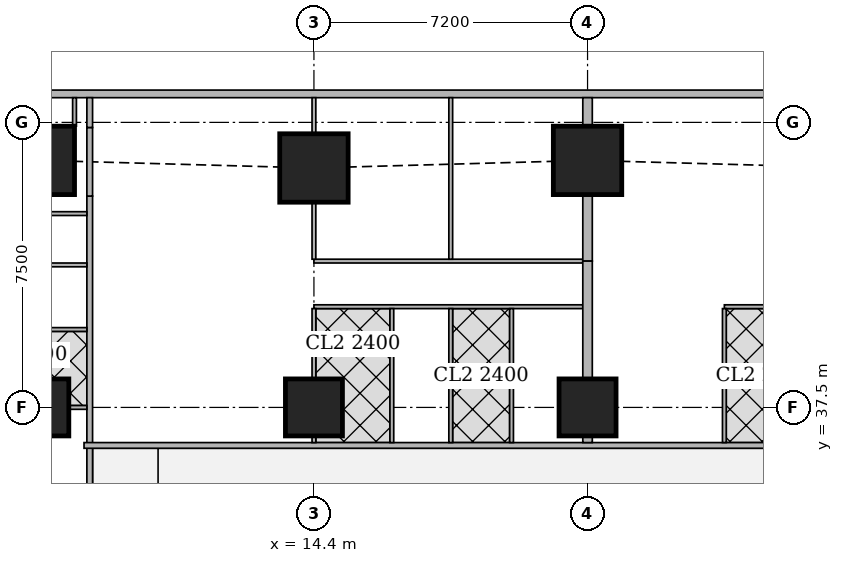
"""IFC4 building model, lengths in metres.
Left out: names, types, materials, properties, quantities, classifications, styles, units other than length and angle.
Written with IfcOpenShell. Run it as: python <this file> out.ifc"""

import sys

from ifc_helpers import new_model, si_unit, direction, frame, frame_2d, origin, origin_2d, place, context, subcontext, project, spatial, rectangle, extrude, element, fill, save


model = new_model("IFC4")
c1 = context("Model", 3, precision=1e-05, world=origin(), true_north=direction((0.0, 1.0)))
c2 = subcontext(c1, "Body", "Model", "MODEL_VIEW")
j1 = project(units=[si_unit("LENGTHUNIT", "METRE"), si_unit("PLANEANGLEUNIT", "RADIAN")], contexts=[c1])
p1 = place(None, origin())
s1 = spatial("IfcSite", under=j1, at=p1, CompositionType="ELEMENT")
p2 = place(p1, origin())
s2 = spatial("IfcBuilding", under=s1, at=p2, CompositionType="ELEMENT")
p3 = place(p2, frame((0.0, 0.0, 180.8)))
s3 = spatial("IfcBuildingStorey", under=s2, at=p3, CompositionType="ELEMENT", Elevation=180.8)
for number, where, z_axis, x_axis in (
    (1, (7.2, 37.5, 0.0), (0.0, 0.0, 1.0), (1.0, 0.0, 0.0)),
    (2, (14.4, 37.5, 0.0), (0.0, 0.0, 1.0), (1.0, 0.0, 0.0)),
    (3, (21.6, 37.5, 0.0), (0.0, 0.0, 1.0), (1.0, 0.0, 0.0)),
):
    element("IfcColumn", number, at=place(p3, frame(where, z_axis=z_axis, x_axis=x_axis)), inside=s3, PredefinedType="COLUMN", context=c2, shape_type="SweptSolid", body=[
        extrude(rectangle(XDim=1.5, YDim=1.5, at=origin_2d()), origin(), (0.0, 0.0, 1.0), 3.75),
    ])
for number, where, z_axis, x_axis in (
    (4, (7.2, 44.0, 0.0), (0.0, 0.0, 1.0), (1.0, 0.0, 0.0)),
    (5, (14.4, 43.8, 0.0), (0.0, 0.0, 1.0), (1.0, 0.0, 0.0)),
    (6, (21.6, 44.0, 0.0), (0.0, 0.0, 1.0), (1.0, 0.0, 0.0)),
):
    element("IfcColumn", number, at=place(p3, frame(where, z_axis=z_axis, x_axis=x_axis)), inside=s3, PredefinedType="COLUMN", context=c2, shape_type="SweptSolid", body=[
        extrude(rectangle(XDim=1.8, YDim=1.8, at=origin_2d()), origin(), (0.0, 0.0, 1.0), 3.75),
    ])
p4 = place(p3, frame((40.106, 45.75, 0.0), z_axis=(0.0, 0.0, 1.0), x_axis=(-1.0, 0.0, 0.0)))
e7 = element("IfcWall", 7, at=p4, inside=s3, PredefinedType="SOLIDWALL", context=c2, shape_type="SweptSolid", body=[
    extrude(rectangle(XDim=37.943, YDim=0.2, at=frame_2d((18.971, 0.0))), origin(), (0.0, 0.0, 1.0), 3.5),
])
p5 = place(p4, frame((8.606, 0.0, 0.9)))
e8 = element("IfcOpeningElement", 8, at=p5, cuts=e7, PredefinedType="OPENING", context=c2, shape_type="SweptSolid", body=[
    extrude(rectangle(XDim=1.8, YDim=1.5, at=frame_2d((0.9, 0.75))), frame((0.0, 0.11, 0.0), z_axis=(0.0, -1.0, 0.0), x_axis=(1.0, 0.0, 0.0)), (0.0, 0.0, 1.0), 0.22),
])
p6 = place(p4, frame((12.206, 0.0, 0.9)))
e9 = element("IfcOpeningElement", 9, at=p6, cuts=e7, PredefinedType="OPENING", context=c2, shape_type="SweptSolid", body=[
    extrude(rectangle(XDim=1.8, YDim=1.5, at=frame_2d((0.9, 0.75))), frame((0.0, 0.11, 0.0), z_axis=(0.0, -1.0, 0.0), x_axis=(1.0, 0.0, 0.0)), (0.0, 0.0, 1.0), 0.22),
])
p7 = place(p4, frame((15.806, 0.0, 0.9)))
e10 = element("IfcOpeningElement", 10, at=p7, cuts=e7, PredefinedType="OPENING", context=c2, shape_type="SweptSolid", body=[
    extrude(rectangle(XDim=1.8, YDim=1.5, at=frame_2d((0.9, 0.75))), frame((0.0, 0.11, 0.0), z_axis=(0.0, -1.0, 0.0), x_axis=(1.0, 0.0, 0.0)), (0.0, 0.0, 1.0), 0.22),
])
p8 = place(p4, frame((19.406, 0.0, 0.9)))
e11 = element("IfcOpeningElement", 11, at=p8, cuts=e7, PredefinedType="OPENING", context=c2, shape_type="SweptSolid", body=[
    extrude(rectangle(XDim=1.8, YDim=1.5, at=frame_2d((0.9, 0.75))), frame((0.0, 0.11, 0.0), z_axis=(0.0, -1.0, 0.0), x_axis=(1.0, 0.0, 0.0)), (0.0, 0.0, 1.0), 0.22),
])
p9 = place(p4, frame((23.006, 0.0, 0.9)))
e12 = element("IfcOpeningElement", 12, at=p9, cuts=e7, PredefinedType="OPENING", context=c2, shape_type="SweptSolid", body=[
    extrude(rectangle(XDim=1.8, YDim=1.5, at=frame_2d((0.9, 0.75))), frame((0.0, 0.11, 0.0), z_axis=(0.0, -1.0, 0.0), x_axis=(1.0, 0.0, 0.0)), (0.0, 0.0, 1.0), 0.22),
])
p10 = place(p4, frame((26.606, 0.0, 0.9)))
e13 = element("IfcOpeningElement", 13, at=p10, cuts=e7, PredefinedType="OPENING", context=c2, shape_type="SweptSolid", body=[
    extrude(rectangle(XDim=1.8, YDim=1.5, at=frame_2d((0.9, 0.75))), frame((0.0, 0.11, 0.0), z_axis=(0.0, -1.0, 0.0), x_axis=(1.0, 0.0, 0.0)), (0.0, 0.0, 1.0), 0.22),
])
p11 = place(p3, frame((8.5, 1.964, 0.0), z_axis=(0.0, 0.0, 1.0), x_axis=(0.0, 1.0, 0.0)))
e14 = element("IfcWall", 14, at=p11, inside=s3, PredefinedType="SOLIDWALL", context=c2, shape_type="SweptSolid", body=[
    extrude(rectangle(XDim=41.097, YDim=0.15, at=frame_2d((20.548, 0.0))), origin(), (0.0, 0.0, 1.0), 3.5),
])
p12 = place(p11, frame((10.661, 0.0, 0.0)))
e15 = element("IfcOpeningElement", 15, at=p12, cuts=e14, PredefinedType="OPENING", context=c2, shape_type="SweptSolid", body=[
    extrude(rectangle(XDim=1.0, YDim=2.1, at=frame_2d((0.5, 1.05))), frame((0.0, 0.085, 0.0), z_axis=(0.0, -1.0, 0.0), x_axis=(1.0, 0.0, 0.0)), (0.0, 0.0, 1.0), 0.17),
])
p13 = place(p11, frame((14.411, 0.0, 0.0)))
e16 = element("IfcOpeningElement", 16, at=p13, cuts=e14, PredefinedType="OPENING", context=c2, shape_type="SweptSolid", body=[
    extrude(rectangle(XDim=1.0, YDim=2.1, at=frame_2d((0.5, 1.05))), frame((0.0, 0.085, 0.0), z_axis=(0.0, -1.0, 0.0), x_axis=(1.0, 0.0, 0.0)), (0.0, 0.0, 1.0), 0.17),
])
p14 = place(p11, frame((21.911, 0.0, 0.0)))
e17 = element("IfcOpeningElement", 17, at=p14, cuts=e14, PredefinedType="OPENING", context=c2, shape_type="SweptSolid", body=[
    extrude(rectangle(XDim=1.0, YDim=2.1, at=frame_2d((0.5, 1.05))), frame((0.0, 0.085, 0.0), z_axis=(0.0, -1.0, 0.0), x_axis=(1.0, 0.0, 0.0)), (0.0, 0.0, 1.0), 0.17),
])
p15 = place(p11, frame((33.161, 0.0, 0.0)))
e18 = element("IfcOpeningElement", 18, at=p15, cuts=e14, PredefinedType="OPENING", context=c2, shape_type="SweptSolid", body=[
    extrude(rectangle(XDim=1.0, YDim=2.1, at=frame_2d((0.5, 1.05))), frame((0.0, 0.085, 0.0), z_axis=(0.0, -1.0, 0.0), x_axis=(1.0, 0.0, 0.0)), (0.0, 0.0, 1.0), 0.17),
])
p16 = place(p3, frame((8.5, 43.061, 0.0), z_axis=(0.0, 0.0, 1.0), x_axis=(0.0, 1.0, 0.0)))
e19 = element("IfcWall", 19, at=p16, inside=s3, PredefinedType="SOLIDWALL", context=c2, shape_type="SweptSolid", body=[
    extrude(rectangle(XDim=1.805, YDim=0.15, at=frame_2d((0.902, 0.0))), origin(), (0.0, 0.0, 1.0), 2.1),
])
p17 = place(p3, frame((8.5, 44.866, 0.0), z_axis=(0.0, 0.0, 1.0), x_axis=(0.0, 1.0, 0.0)))
e20 = element("IfcWall", 20, at=p17, inside=s3, PredefinedType="SOLIDWALL", context=c2, shape_type="SweptSolid", body=[
    extrude(rectangle(XDim=0.784, YDim=0.15, at=frame_2d((0.392, 0.0))), origin(), (0.0, 0.0, 1.0), 3.5),
])
p18 = place(p3, frame((8.35, 36.5, 0.0), z_axis=(0.0, 0.0, 1.0), x_axis=(1.0, 0.0, 0.0)))
e21 = element("IfcWall", 21, at=p18, inside=s3, PredefinedType="SOLIDWALL", context=c2, shape_type="SweptSolid", body=[
    extrude(rectangle(XDim=26.415, YDim=0.15, at=frame_2d((13.208, 0.0))), origin(), (0.0, 0.0, 1.0), 3.5),
])
p19 = place(p18, frame((2.6, 0.0, 0.0)))
e22 = element("IfcOpeningElement", 22, at=p19, cuts=e21, PredefinedType="OPENING", context=c2, shape_type="SweptSolid", body=[
    extrude(rectangle(XDim=1.0, YDim=2.1, at=frame_2d((0.5, 1.05))), frame((0.0, 0.085, 0.0), z_axis=(0.0, -1.0, 0.0), x_axis=(1.0, 0.0, 0.0)), (0.0, 0.0, 1.0), 0.17),
])
p20 = place(p18, frame((14.75, 0.0, 0.0)))
e23 = element("IfcOpeningElement", 23, at=p20, cuts=e21, PredefinedType="OPENING", context=c2, shape_type="SweptSolid", body=[
    extrude(rectangle(XDim=1.0, YDim=2.1, at=frame_2d((0.5, 1.05))), frame((0.0, 0.085, 0.0), z_axis=(0.0, -1.0, 0.0), x_axis=(1.0, 0.0, 0.0)), (0.0, 0.0, 1.0), 0.17),
])
p21 = place(p18, frame((23.923, 0.0, 0.0)))
e24 = element("IfcOpeningElement", 24, at=p21, cuts=e21, PredefinedType="OPENING", context=c2, shape_type="SweptSolid", body=[
    extrude(rectangle(XDim=1.0, YDim=2.1, at=frame_2d((0.5, 1.05))), frame((0.0, 0.085, 0.0), z_axis=(0.0, -1.0, 0.0), x_axis=(1.0, 0.0, 0.0)), (0.0, 0.0, 1.0), 0.17),
])
p22 = place(p3, frame((8.1, 45.65, 0.0), z_axis=(0.0, 0.0, 1.0), x_axis=(0.0, -1.0, 0.0)))
e25 = element("IfcWall", 25, at=p22, inside=s3, PredefinedType="PARTITIONING", context=c2, shape_type="SweptSolid", body=[
    extrude(rectangle(XDim=0.749, YDim=0.1, at=frame_2d((0.375, 0.0))), origin(), (0.0, 0.0, 1.0), 3.5),
])
p23 = place(p3, frame((7.951, 37.5, 0.0), z_axis=(0.0, 0.0, 1.0), x_axis=(1.0, 0.0, 0.0)))
e26 = element("IfcWall", 26, at=p23, inside=s3, PredefinedType="PARTITIONING", context=c2, shape_type="SweptSolid", body=[
    extrude(rectangle(XDim=0.474, YDim=0.1, at=frame_2d((0.237, 0.0))), origin(), (0.0, 0.0, 1.0), 3.5),
])
for number, where, z_axis, x_axis in (
    (27, (4.9, 41.25, 0.0), (0.0, 0.0, 1.0), (1.0, 0.0, 0.0)),
    (28, (4.9, 39.55, 0.0), (0.0, 0.0, 1.0), (1.0, 0.0, 0.0)),
):
    element("IfcWall", number, at=place(p3, frame(where, z_axis=z_axis, x_axis=x_axis)), inside=s3, PredefinedType="PARTITIONING", context=c2, shape_type="SweptSolid", body=[
        extrude(rectangle(XDim=3.525, YDim=0.1, at=frame_2d((1.763, 0.0))), origin(), (0.0, 0.0, 1.0), 3.5),
    ])
p24 = place(p3, frame((14.4, 41.35, 0.0), z_axis=(0.0, 0.0, 1.0), x_axis=(1.0, 0.0, 0.0)))
e29 = element("IfcWall", 29, at=p24, inside=s3, PredefinedType="PARTITIONING", context=c2, shape_type="SweptSolid", body=[
    extrude(rectangle(XDim=7.075, YDim=0.1, at=frame_2d((3.538, 0.0))), origin(), (0.0, 0.0, 1.0), 3.5),
])
p25 = place(p24, frame((0.2, 0.0, 0.0)))
e30 = element("IfcOpeningElement", 30, at=p25, cuts=e29, PredefinedType="OPENING", context=c2, shape_type="SweptSolid", body=[
    extrude(rectangle(XDim=0.9, YDim=2.1, at=frame_2d((0.45, 1.05))), frame((0.0, 0.06, 0.0), z_axis=(0.0, -1.0, 0.0), x_axis=(1.0, 0.0, 0.0)), (0.0, 0.0, 1.0), 0.12),
])
p26 = place(p24, frame((3.8, 0.0, 0.0)))
e31 = element("IfcOpeningElement", 31, at=p26, cuts=e29, PredefinedType="OPENING", context=c2, shape_type="SweptSolid", body=[
    extrude(rectangle(XDim=0.9, YDim=2.1, at=frame_2d((0.45, 1.05))), frame((0.0, 0.06, 0.0), z_axis=(0.0, -1.0, 0.0), x_axis=(1.0, 0.0, 0.0)), (0.0, 0.0, 1.0), 0.12),
])
p27 = place(p3, frame((14.4, 40.15, 0.0), z_axis=(0.0, 0.0, 1.0), x_axis=(1.0, 0.0, 0.0)))
e32 = element("IfcWall", 32, at=p27, inside=s3, PredefinedType="PARTITIONING", context=c2, shape_type="SweptSolid", body=[
    extrude(rectangle(XDim=7.075, YDim=0.1, at=frame_2d((3.538, 0.0))), origin(), (0.0, 0.0, 1.0), 3.5),
])
p28 = place(p27, frame((0.575, 0.0, 0.0)))
e33 = element("IfcOpeningElement", 33, at=p28, cuts=e32, PredefinedType="OPENING", context=c2, shape_type="SweptSolid", body=[
    extrude(rectangle(XDim=0.9, YDim=2.1, at=frame_2d((0.45, 1.05))), frame((0.0, 0.06, 0.0), z_axis=(0.0, -1.0, 0.0), x_axis=(1.0, 0.0, 0.0)), (0.0, 0.0, 1.0), 0.12),
])
p29 = place(p27, frame((3.95, 0.0, 0.0)))
e34 = element("IfcOpeningElement", 34, at=p29, cuts=e32, PredefinedType="OPENING", context=c2, shape_type="SweptSolid", body=[
    extrude(rectangle(XDim=0.9, YDim=2.1, at=frame_2d((0.45, 1.05))), frame((0.0, 0.06, 0.0), z_axis=(0.0, -1.0, 0.0), x_axis=(1.0, 0.0, 0.0)), (0.0, 0.0, 1.0), 0.12),
])
p30 = place(p27, frame((2.375, 0.0, 0.0)))
e35 = element("IfcOpeningElement", 35, at=p30, cuts=e32, PredefinedType="OPENING", context=c2, shape_type="SweptSolid", body=[
    extrude(rectangle(XDim=0.9, YDim=2.1, at=frame_2d((0.45, 1.05))), frame((0.0, 0.06, 0.0), z_axis=(0.0, -1.0, 0.0), x_axis=(1.0, 0.0, 0.0)), (0.0, 0.0, 1.0), 0.12),
])
p31 = place(p27, frame((5.75, 0.0, 0.0)))
e36 = element("IfcOpeningElement", 36, at=p31, cuts=e32, PredefinedType="OPENING", context=c2, shape_type="SweptSolid", body=[
    extrude(rectangle(XDim=0.9, YDim=2.1, at=frame_2d((0.45, 1.05))), frame((0.0, 0.06, 0.0), z_axis=(0.0, -1.0, 0.0), x_axis=(1.0, 0.0, 0.0)), (0.0, 0.0, 1.0), 0.12),
])
p32 = place(p3, frame((14.4, 41.4, 0.0), z_axis=(0.0, 0.0, 1.0), x_axis=(0.0, 1.0, 0.0)))
e37 = element("IfcWall", 37, at=p32, inside=s3, PredefinedType="PARTITIONING", context=c2, shape_type="SweptSolid", body=[
    extrude(rectangle(XDim=1.499, YDim=0.1, at=frame_2d((0.75, 0.0))), origin(), (0.0, 0.0, 1.0), 3.5),
])
p33 = place(p3, frame((14.4, 44.701, 0.0), z_axis=(0.0, 0.0, 1.0), x_axis=(0.0, 1.0, 0.0)))
e38 = element("IfcWall", 38, at=p33, inside=s3, PredefinedType="PARTITIONING", context=c2, shape_type="SweptSolid", body=[
    extrude(rectangle(XDim=0.949, YDim=0.1, at=frame_2d((0.475, 0.0))), origin(), (0.0, 0.0, 1.0), 3.5),
])
p34 = place(p3, frame((18.0, 41.4, 0.0), z_axis=(0.0, 0.0, 1.0), x_axis=(0.0, 1.0, 0.0)))
e39 = element("IfcWall", 39, at=p34, inside=s3, PredefinedType="PARTITIONING", context=c2, shape_type="SweptSolid", body=[
    extrude(rectangle(XDim=4.25, YDim=0.1, at=frame_2d((2.125, 0.0))), origin(), (0.0, 0.0, 1.0), 2.1),
])
p35 = place(p3, frame((14.4, 36.575, 0.0), z_axis=(0.0, 0.0, 1.0), x_axis=(0.0, 1.0, 0.0)))
e40 = element("IfcWall", 40, at=p35, inside=s3, PredefinedType="PARTITIONING", context=c2, shape_type="SweptSolid", body=[
    extrude(rectangle(XDim=0.174, YDim=0.1, at=frame_2d((0.087, 0.0))), origin(), (0.0, 0.0, 1.0), 3.5),
])
p36 = place(p3, frame((14.4, 38.251, 0.0), z_axis=(0.0, 0.0, 1.0), x_axis=(0.0, 1.0, 0.0)))
e41 = element("IfcWall", 41, at=p36, inside=s3, PredefinedType="PARTITIONING", context=c2, shape_type="SweptSolid", body=[
    extrude(rectangle(XDim=1.849, YDim=0.1, at=frame_2d((0.925, 0.0))), origin(), (0.0, 0.0, 1.0), 3.5),
])
for number, where, z_axis, x_axis in (
    (42, (18.0, 36.575, 0.0), (0.0, 0.0, 1.0), (0.0, 1.0, 0.0)),
    (43, (16.45, 36.575, 0.0), (0.0, 0.0, 1.0), (0.0, 1.0, 0.0)),
    (44, (19.6, 36.575, 0.0), (0.0, 0.0, 1.0), (0.0, 1.0, 0.0)),
):
    element("IfcWall", number, at=place(p3, frame(where, z_axis=z_axis, x_axis=x_axis)), inside=s3, PredefinedType="PARTITIONING", context=c2, shape_type="SweptSolid", body=[
        extrude(rectangle(XDim=3.525, YDim=0.1, at=frame_2d((1.763, 0.0))), origin(), (0.0, 0.0, 1.0), 3.5),
    ])
p37 = place(p3, frame((25.2, 40.15, 0.0), z_axis=(0.0, 0.0, 1.0), x_axis=(1.0, 0.0, 0.0)))
e45 = element("IfcWall", 45, at=p37, inside=s3, PredefinedType="PARTITIONING", context=c2, shape_type="SweptSolid", body=[
    extrude(rectangle(XDim=3.475, YDim=0.1, at=frame_2d((1.738, 0.0))), origin(), (0.0, 0.0, 1.0), 3.5),
])
p38 = place(p37, frame((0.575, 0.0, 0.0)))
e46 = element("IfcOpeningElement", 46, at=p38, cuts=e45, PredefinedType="OPENING", context=c2, shape_type="SweptSolid", body=[
    extrude(rectangle(XDim=0.9, YDim=2.1, at=frame_2d((0.45, 1.05))), frame((0.0, 0.06, 0.0), z_axis=(0.0, -1.0, 0.0), x_axis=(1.0, 0.0, 0.0)), (0.0, 0.0, 1.0), 0.12),
])
p39 = place(p37, frame((2.375, 0.0, 0.0)))
e47 = element("IfcOpeningElement", 47, at=p39, cuts=e45, PredefinedType="OPENING", context=c2, shape_type="SweptSolid", body=[
    extrude(rectangle(XDim=0.9, YDim=2.1, at=frame_2d((0.45, 1.05))), frame((0.0, 0.06, 0.0), z_axis=(0.0, -1.0, 0.0), x_axis=(1.0, 0.0, 0.0)), (0.0, 0.0, 1.0), 0.12),
])
p40 = place(p3, frame((25.2, 36.575, 0.0), z_axis=(0.0, 0.0, 1.0), x_axis=(0.0, 1.0, 0.0)))
e48 = element("IfcWall", 48, at=p40, inside=s3, PredefinedType="PARTITIONING", context=c2, shape_type="SweptSolid", body=[
    extrude(rectangle(XDim=3.525, YDim=0.1, at=frame_2d((1.763, 0.0))), origin(), (0.0, 0.0, 1.0), 3.5),
])
p41 = place(p3, frame((21.6, 41.35, 0.0), z_axis=(0.0, 0.0, 1.0), x_axis=(0.0, 1.0, 0.0)))
e49 = element("IfcWall", 49, at=p41, inside=s3, PredefinedType="SOLIDWALL", context=c2, shape_type="SweptSolid", body=[
    extrude(rectangle(XDim=1.749, YDim=0.25, at=frame_2d((0.875, 0.0))), origin(), (0.0, 0.0, 1.0), 2.1),
])
p42 = place(p3, frame((21.6, 44.901, 0.0), z_axis=(0.0, 0.0, 1.0), x_axis=(0.0, 1.0, 0.0)))
e50 = element("IfcWall", 50, at=p42, inside=s3, PredefinedType="SOLIDWALL", context=c2, shape_type="SweptSolid", body=[
    extrude(rectangle(XDim=0.749, YDim=0.25, at=frame_2d((0.375, 0.0))), origin(), (0.0, 0.0, 1.0), 2.1),
])
p43 = place(p3, frame((21.6, 36.575, 0.0), z_axis=(0.0, 0.0, 1.0), x_axis=(0.0, 1.0, 0.0)))
e51 = element("IfcWall", 51, at=p43, inside=s3, PredefinedType="SOLIDWALL", context=c2, shape_type="SweptSolid", body=[
    extrude(rectangle(XDim=0.174, YDim=0.25, at=frame_2d((0.087, 0.0))), origin(), (0.0, 0.0, 1.0), 3.5),
])
p44 = place(p3, frame((21.6, 38.251, 0.0), z_axis=(0.0, 0.0, 1.0), x_axis=(0.0, 1.0, 0.0)))
e52 = element("IfcWall", 52, at=p44, inside=s3, PredefinedType="SOLIDWALL", context=c2, shape_type="SweptSolid", body=[
    extrude(rectangle(XDim=3.099, YDim=0.25, at=frame_2d((1.55, 0.0))), origin(), (0.0, 0.0, 1.0), 3.5),
])
p45 = place(p3, frame((8.425, 42.6, 0.0), z_axis=(0.0, 0.0, 1.0), x_axis=(-1.0, 0.0, 0.0)))
e53 = element("IfcWall", 53, at=p45, inside=s3, PredefinedType="PARTITIONING", context=c2, shape_type="SweptSolid", body=[
    extrude(rectangle(XDim=3.022, YDim=0.1, at=frame_2d((1.511, 0.0))), origin(), (0.0, 0.0, 1.0), 3.5),
])
p46 = place(p45, frame((1.95, 0.0, 0.0)))
e54 = element("IfcOpeningElement", 54, at=p46, cuts=e53, PredefinedType="OPENING", context=c2, shape_type="SweptSolid", body=[
    extrude(rectangle(XDim=0.9, YDim=2.1, at=frame_2d((0.45, 1.05))), frame((0.0, 0.06, 0.0), z_axis=(0.0, -1.0, 0.0), x_axis=(1.0, 0.0, 0.0)), (0.0, 0.0, 1.0), 0.12),
])
p47 = place(p6, origin())
e55 = element("IfcWindow", 55, at=p47, inside=s3, PartitioningType="SINGLE_PANEL", PredefinedType="WINDOW", context=c2, shape_type="SweptSolid", body=[
    extrude(rectangle(XDim=1.8, YDim=1.5, at=frame_2d((0.9, 0.75))), frame((0.0, 0.03, 0.0), z_axis=(0.0, -1.0, 0.0), x_axis=(1.0, 0.0, 0.0)), (0.0, 0.0, 1.0), 0.06),
])
fill(e9, e55)
p48 = place(p7, origin())
e56 = element("IfcWindow", 56, at=p48, inside=s3, PartitioningType="SINGLE_PANEL", PredefinedType="WINDOW", context=c2, shape_type="SweptSolid", body=[
    extrude(rectangle(XDim=1.8, YDim=1.5, at=frame_2d((0.9, 0.75))), frame((0.0, 0.03, 0.0), z_axis=(0.0, -1.0, 0.0), x_axis=(1.0, 0.0, 0.0)), (0.0, 0.0, 1.0), 0.06),
])
fill(e10, e56)
p49 = place(p8, origin())
e57 = element("IfcWindow", 57, at=p49, inside=s3, PartitioningType="SINGLE_PANEL", PredefinedType="WINDOW", context=c2, shape_type="SweptSolid", body=[
    extrude(rectangle(XDim=1.8, YDim=1.5, at=frame_2d((0.9, 0.75))), frame((0.0, 0.03, 0.0), z_axis=(0.0, -1.0, 0.0), x_axis=(1.0, 0.0, 0.0)), (0.0, 0.0, 1.0), 0.06),
])
fill(e11, e57)
p50 = place(p9, origin())
e58 = element("IfcWindow", 58, at=p50, inside=s3, PartitioningType="SINGLE_PANEL", PredefinedType="WINDOW", context=c2, shape_type="SweptSolid", body=[
    extrude(rectangle(XDim=1.8, YDim=1.5, at=frame_2d((0.9, 0.75))), frame((0.0, 0.03, 0.0), z_axis=(0.0, -1.0, 0.0), x_axis=(1.0, 0.0, 0.0)), (0.0, 0.0, 1.0), 0.06),
])
fill(e12, e58)
p51 = place(p10, origin())
e59 = element("IfcWindow", 59, at=p51, inside=s3, PartitioningType="SINGLE_PANEL", PredefinedType="WINDOW", context=c2, shape_type="SweptSolid", body=[
    extrude(rectangle(XDim=1.8, YDim=1.5, at=frame_2d((0.9, 0.75))), frame((0.0, 0.03, 0.0), z_axis=(0.0, -1.0, 0.0), x_axis=(1.0, 0.0, 0.0)), (0.0, 0.0, 1.0), 0.06),
])
fill(e13, e59)
p52 = place(p15, origin())
e60 = element("IfcDoor", 60, at=p52, inside=s3, OperationType="SINGLE_SWING_RIGHT", PredefinedType="DOOR", context=c2, shape_type="SweptSolid", body=[
    extrude(rectangle(XDim=1.0, YDim=2.1, at=frame_2d((0.5, 1.05))), frame((0.0, 0.025, 0.0), z_axis=(0.0, -1.0, 0.0), x_axis=(1.0, 0.0, 0.0)), (0.0, 0.0, 1.0), 0.05),
])
fill(e18, e60)
p53 = place(p25, origin())
e61 = element("IfcDoor", 61, at=p53, inside=s3, OperationType="SINGLE_SWING_LEFT", PredefinedType="DOOR", context=c2, shape_type="SweptSolid", body=[
    extrude(rectangle(XDim=0.9, YDim=2.1, at=frame_2d((0.45, 1.05))), frame((0.0, 0.025, 0.0), z_axis=(0.0, -1.0, 0.0), x_axis=(1.0, 0.0, 0.0)), (0.0, 0.0, 1.0), 0.05),
])
fill(e30, e61)
p54 = place(p26, origin())
e62 = element("IfcDoor", 62, at=p54, inside=s3, OperationType="SINGLE_SWING_LEFT", PredefinedType="DOOR", context=c2, shape_type="SweptSolid", body=[
    extrude(rectangle(XDim=0.9, YDim=2.1, at=frame_2d((0.45, 1.05))), frame((0.0, 0.025, 0.0), z_axis=(0.0, -1.0, 0.0), x_axis=(1.0, 0.0, 0.0)), (0.0, 0.0, 1.0), 0.05),
])
fill(e31, e62)
p55 = place(p28, origin())
e63 = element("IfcDoor", 63, at=p55, inside=s3, OperationType="SINGLE_SWING_RIGHT", PredefinedType="DOOR", context=c2, shape_type="SweptSolid", body=[
    extrude(rectangle(XDim=0.9, YDim=2.1, at=frame_2d((0.45, 1.05))), frame((0.0, 0.025, 0.0), z_axis=(0.0, -1.0, 0.0), x_axis=(1.0, 0.0, 0.0)), (0.0, 0.0, 1.0), 0.05),
])
fill(e33, e63)
p56 = place(p29, origin())
e64 = element("IfcDoor", 64, at=p56, inside=s3, OperationType="SINGLE_SWING_LEFT", PredefinedType="DOOR", context=c2, shape_type="SweptSolid", body=[
    extrude(rectangle(XDim=0.9, YDim=2.1, at=frame_2d((0.45, 1.05))), frame((0.0, 0.025, 0.0), z_axis=(0.0, -1.0, 0.0), x_axis=(1.0, 0.0, 0.0)), (0.0, 0.0, 1.0), 0.05),
])
fill(e34, e64)
p57 = place(p30, origin())
e65 = element("IfcDoor", 65, at=p57, inside=s3, OperationType="SINGLE_SWING_LEFT", PredefinedType="DOOR", context=c2, shape_type="SweptSolid", body=[
    extrude(rectangle(XDim=0.9, YDim=2.1, at=frame_2d((0.45, 1.05))), frame((0.0, 0.025, 0.0), z_axis=(0.0, -1.0, 0.0), x_axis=(1.0, 0.0, 0.0)), (0.0, 0.0, 1.0), 0.05),
])
fill(e35, e65)
p58 = place(p31, origin())
e66 = element("IfcDoor", 66, at=p58, inside=s3, OperationType="SINGLE_SWING_LEFT", PredefinedType="DOOR", context=c2, shape_type="SweptSolid", body=[
    extrude(rectangle(XDim=0.9, YDim=2.1, at=frame_2d((0.45, 1.05))), frame((0.0, 0.025, 0.0), z_axis=(0.0, -1.0, 0.0), x_axis=(1.0, 0.0, 0.0)), (0.0, 0.0, 1.0), 0.05),
])
fill(e36, e66)
p59 = place(p19, origin())
e67 = element("IfcDoor", 67, at=p59, inside=s3, OperationType="SINGLE_SWING_LEFT", PredefinedType="DOOR", context=c2, shape_type="SweptSolid", body=[
    extrude(rectangle(XDim=1.0, YDim=2.1, at=frame_2d((0.5, 1.05))), frame((0.0, 0.025, 0.0), z_axis=(0.0, -1.0, 0.0), x_axis=(1.0, 0.0, 0.0)), (0.0, 0.0, 1.0), 0.05),
])
fill(e22, e67)
p60 = place(p38, origin())
e68 = element("IfcDoor", 68, at=p60, inside=s3, OperationType="SINGLE_SWING_RIGHT", PredefinedType="DOOR", context=c2, shape_type="SweptSolid", body=[
    extrude(rectangle(XDim=0.9, YDim=2.1, at=frame_2d((0.45, 1.05))), frame((0.0, 0.025, 0.0), z_axis=(0.0, -1.0, 0.0), x_axis=(1.0, 0.0, 0.0)), (0.0, 0.0, 1.0), 0.05),
])
fill(e46, e68)
p61 = place(p20, origin())
e69 = element("IfcDoor", 69, at=p61, inside=s3, OperationType="SINGLE_SWING_RIGHT", PredefinedType="DOOR", context=c2, shape_type="SweptSolid", body=[
    extrude(rectangle(XDim=1.0, YDim=2.1, at=frame_2d((0.5, 1.05))), frame((0.0, 0.025, 0.0), z_axis=(0.0, -1.0, 0.0), x_axis=(1.0, 0.0, 0.0)), (0.0, 0.0, 1.0), 0.05),
])
fill(e23, e69)
save(model, sys.argv[1])
